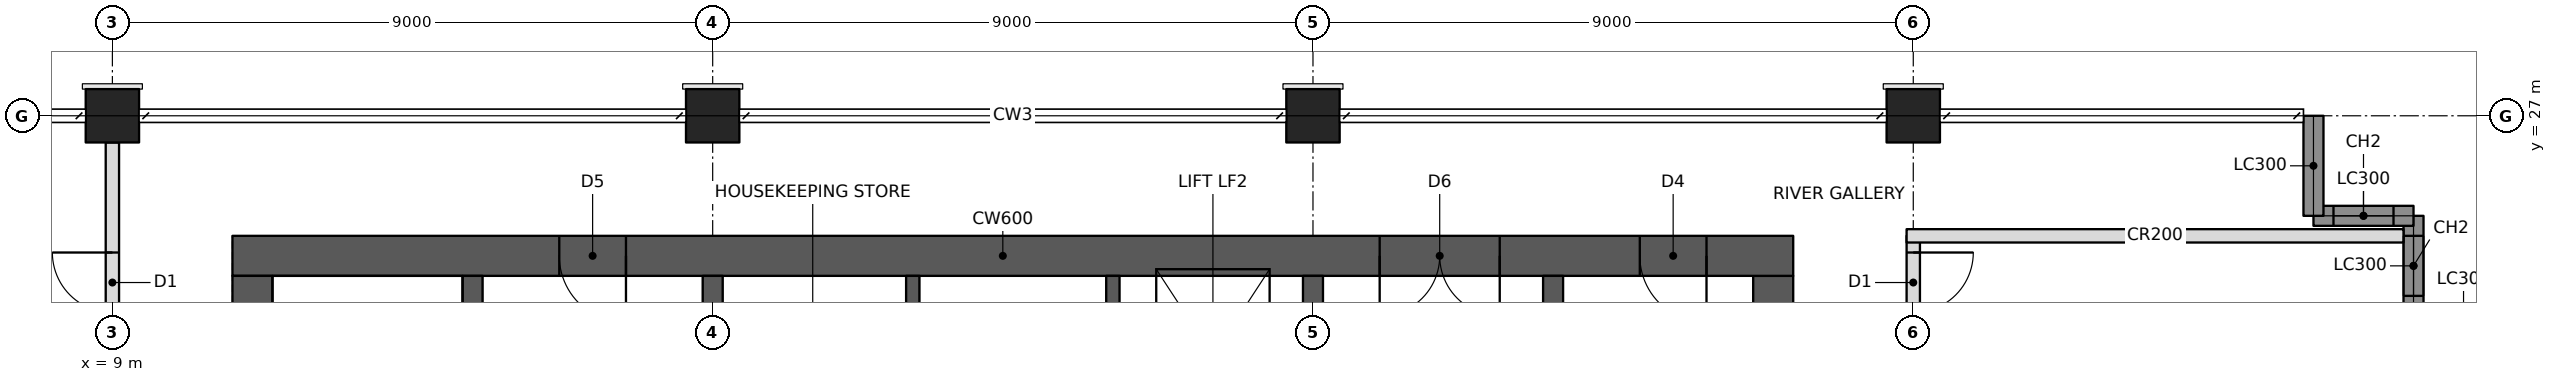
"""IFC4 building model, lengths in metres.
Left out: names, types, materials, properties, quantities, classifications, styles, units other than length and angle.
Written with IfcOpenShell. Run it as: python <this file> out.ifc"""

import sys

from ifc_helpers import new_model, si_unit, direction, frame, frame_2d, origin, origin_2d, place, context, subcontext, project, spatial, rectangle, hollow_rectangle, extrude, element, fill, save


model = new_model("IFC4")
c1 = context("Model", 3, precision=1e-05, world=origin(), true_north=direction((0.0, 1.0)))
c2 = subcontext(c1, "Body", "Model", "MODEL_VIEW")
j1 = project(units=[si_unit("LENGTHUNIT", "METRE"), si_unit("PLANEANGLEUNIT", "RADIAN")], contexts=[c1])
p1 = place(None, origin())
s1 = spatial("IfcSite", under=j1, at=p1, CompositionType="ELEMENT")
p2 = place(p1, origin())
s2 = spatial("IfcBuilding", under=s1, at=p2, CompositionType="ELEMENT")
p3 = place(p2, frame((0.0, 0.0, 197.8)))
s3 = spatial("IfcBuildingStorey", under=s2, at=p3, CompositionType="ELEMENT", Elevation=197.8)
for number, where, z_axis, x_axis in (
    (1, (9.0, 27.0, 0.0), (0.0, 0.0, 1.0), (1.0, 0.0, 0.0)),
    (2, (18.0, 27.0, 0.0), (0.0, 0.0, 1.0), (1.0, 0.0, 0.0)),
    (3, (27.0, 27.0, 0.0), (0.0, 0.0, 1.0), (1.0, 0.0, 0.0)),
    (4, (36.0, 27.0, 0.0), (0.0, 0.0, 1.0), (1.0, 0.0, 0.0)),
):
    element("IfcColumn", number, at=place(p3, frame(where, z_axis=z_axis, x_axis=x_axis)), inside=s3, PredefinedType="COLUMN", context=c2, shape_type="SweptSolid", body=[
        extrude(hollow_rectangle(XDim=0.8, YDim=0.8, WallThickness=0.06, at=origin_2d()), origin(), (0.0, 0.0, 1.0), 3.4),
    ])
p4 = place(p3, frame((10.8, 24.9, 0.0), z_axis=(0.0, 0.0, 1.0), x_axis=(1.0, 0.0, 0.0)))
e5 = element("IfcWall", 5, at=p4, inside=s3, PredefinedType="SHEAR", context=c2, shape_type="SweptSolid", body=[
    extrude(rectangle(XDim=23.4, YDim=0.6, at=frame_2d((11.7, 0.0))), origin(), (0.0, 0.0, 1.0), 3.4),
])
p5 = place(p4, frame((17.2, 0.0, 0.0)))
e6 = element("IfcOpeningElement", 6, at=p5, cuts=e5, PredefinedType="OPENING", context=c2, shape_type="SweptSolid", body=[
    extrude(rectangle(XDim=1.8, YDim=2.1, at=frame_2d((0.9, 1.05))), frame((0.0, 0.31, 0.0), z_axis=(0.0, -1.0, 0.0), x_axis=(1.0, 0.0, 0.0)), (0.0, 0.0, 1.0), 0.62),
])
p6 = place(p4, frame((21.1, 0.0, 0.0)))
e7 = element("IfcOpeningElement", 7, at=p6, cuts=e5, PredefinedType="OPENING", context=c2, shape_type="SweptSolid", body=[
    extrude(rectangle(XDim=1.0, YDim=2.1, at=frame_2d((0.5, 1.05))), frame((0.0, 0.31, 0.0), z_axis=(0.0, -1.0, 0.0), x_axis=(1.0, 0.0, 0.0)), (0.0, 0.0, 1.0), 0.62),
])
p7 = place(p4, frame((4.9, 0.0, 0.0)))
e8 = element("IfcOpeningElement", 8, at=p7, cuts=e5, PredefinedType="OPENING", context=c2, shape_type="SweptSolid", body=[
    extrude(rectangle(XDim=1.0, YDim=2.1, at=frame_2d((0.5, 1.05))), frame((0.0, 0.31, 0.0), z_axis=(0.0, -1.0, 0.0), x_axis=(1.0, 0.0, 0.0)), (0.0, 0.0, 1.0), 0.62),
])
for number, where, z_axis, x_axis in (
    (9, (11.1, 11.4, 0.0), (0.0, 0.0, 1.0), (0.0, 1.0, 0.0)),
    (10, (33.9, 11.4, 0.0), (0.0, 0.0, 1.0), (0.0, 1.0, 0.0)),
):
    element("IfcWall", number, at=place(p3, frame(where, z_axis=z_axis, x_axis=x_axis)), inside=s3, PredefinedType="SHEAR", context=c2, shape_type="SweptSolid", body=[
        extrude(rectangle(XDim=13.2, YDim=0.6, at=frame_2d((6.6, 0.0))), origin(), (0.0, 0.0, 1.0), 3.4),
    ])
p8 = place(p3, frame((14.4, 11.4, 0.0), z_axis=(0.0, 0.0, 1.0), x_axis=(0.0, 1.0, 0.0)))
e11 = element("IfcWall", 11, at=p8, inside=s3, PredefinedType="SHEAR", context=c2, shape_type="SweptSolid", body=[
    extrude(rectangle(XDim=13.2, YDim=0.3, at=frame_2d((6.6, 0.0))), origin(), (0.0, 0.0, 1.0), 3.4),
])
p9 = place(p3, frame((18.0, 11.4, 0.0), z_axis=(0.0, 0.0, 1.0), x_axis=(0.0, 1.0, 0.0)))
e12 = element("IfcWall", 12, at=p9, inside=s3, PredefinedType="SHEAR", context=c2, shape_type="SweptSolid", body=[
    extrude(rectangle(XDim=13.2, YDim=0.3, at=frame_2d((6.6, 0.0))), origin(), (0.0, 0.0, 1.0), 3.4),
])
p10 = place(p9, frame((3.6, 0.0, 0.0)))
e13 = element("IfcOpeningElement", 13, at=p10, cuts=e12, PredefinedType="OPENING", context=c2, shape_type="SweptSolid", body=[
    extrude(rectangle(XDim=1.0, YDim=2.1, at=frame_2d((0.5, 1.05))), frame((0.0, 0.16, 0.0), z_axis=(0.0, -1.0, 0.0), x_axis=(1.0, 0.0, 0.0)), (0.0, 0.0, 1.0), 0.32),
])
p11 = place(p9, frame((7.85, 0.0, 0.0)))
e14 = element("IfcOpeningElement", 14, at=p11, cuts=e12, PredefinedType="OPENING", context=c2, shape_type="SweptSolid", body=[
    extrude(rectangle(XDim=1.1, YDim=2.1, at=frame_2d((0.55, 1.05))), frame((0.0, 0.16, 0.0), z_axis=(0.0, -1.0, 0.0), x_axis=(1.0, 0.0, 0.0)), (0.0, 0.0, 1.0), 0.32),
])
p12 = place(p3, frame((27.0, 21.75, 0.0), z_axis=(0.0, 0.0, 1.0), x_axis=(0.0, 1.0, 0.0)))
e15 = element("IfcWall", 15, at=p12, inside=s3, PredefinedType="SHEAR", context=c2, shape_type="SweptSolid", body=[
    extrude(rectangle(XDim=2.85, YDim=0.3, at=frame_2d((1.425, 0.0))), origin(), (0.0, 0.0, 1.0), 3.4),
])
for number, where, z_axis, x_axis in (
    (16, (21.0, 21.75, 0.0), (0.0, 0.0, 1.0), (0.0, 1.0, 0.0)),
    (17, (24.0, 21.75, 0.0), (0.0, 0.0, 1.0), (0.0, 1.0, 0.0)),
):
    element("IfcWall", number, at=place(p3, frame(where, z_axis=z_axis, x_axis=x_axis)), inside=s3, PredefinedType="SHEAR", context=c2, shape_type="SweptSolid", body=[
        extrude(rectangle(XDim=2.85, YDim=0.2, at=frame_2d((1.425, 0.0))), origin(), (0.0, 0.0, 1.0), 3.4),
    ])
p13 = place(p3, frame((30.6, 11.4, 0.0), z_axis=(0.0, 0.0, 1.0), x_axis=(0.0, 1.0, 0.0)))
e18 = element("IfcWall", 18, at=p13, inside=s3, PredefinedType="SHEAR", context=c2, shape_type="SweptSolid", body=[
    extrude(rectangle(XDim=13.2, YDim=0.3, at=frame_2d((6.6, 0.0))), origin(), (0.0, 0.0, 1.0), 3.4),
])
p14 = place(p3, frame((43.5, 24.0, 0.0), z_axis=(0.0, 0.0, 1.0), x_axis=(0.0, 1.0, 0.0)))
e19 = element("IfcWall", 19, at=p14, inside=s3, PredefinedType="SOLIDWALL", context=c2, shape_type="SweptSolid", body=[
    extrude(rectangle(XDim=1.5, YDim=0.3, at=frame_2d((0.75, 0.0))), origin(), (0.0, 0.0, 1.0), 3.2),
])
p15 = place(p14, frame((0.3, 0.0, 0.6)))
e20 = element("IfcOpeningElement", 20, at=p15, cuts=e19, PredefinedType="OPENING", context=c2, shape_type="SweptSolid", body=[
    extrude(rectangle(XDim=0.9, YDim=2.2, at=frame_2d((0.45, 1.1))), frame((0.0, 0.16, 0.0), z_axis=(0.0, -1.0, 0.0), x_axis=(1.0, 0.0, 0.0)), (0.0, 0.0, 1.0), 0.32),
])
p16 = place(p3, frame((43.5, 25.5, 0.0), z_axis=(0.0, 0.0, 1.0), x_axis=(-1.0, 0.0, 0.0)))
e21 = element("IfcWall", 21, at=p16, inside=s3, PredefinedType="SOLIDWALL", context=c2, shape_type="SweptSolid", body=[
    extrude(rectangle(XDim=1.5, YDim=0.3, at=frame_2d((0.75, 0.0))), origin(), (0.0, 0.0, 1.0), 3.2),
])
p17 = place(p16, frame((0.3, 0.0, 0.6)))
e22 = element("IfcOpeningElement", 22, at=p17, cuts=e21, PredefinedType="OPENING", context=c2, shape_type="SweptSolid", body=[
    extrude(rectangle(XDim=0.9, YDim=2.2, at=frame_2d((0.45, 1.1))), frame((0.0, 0.16, 0.0), z_axis=(0.0, -1.0, 0.0), x_axis=(1.0, 0.0, 0.0)), (0.0, 0.0, 1.0), 0.32),
])
p18 = place(p3, frame((42.0, 25.5, 0.0), z_axis=(0.0, 0.0, 1.0), x_axis=(0.0, 1.0, 0.0)))
e23 = element("IfcWall", 23, at=p18, inside=s3, PredefinedType="SOLIDWALL", context=c2, shape_type="SweptSolid", body=[
    extrude(rectangle(XDim=1.5, YDim=0.3, at=frame_2d((0.75, 0.0))), origin(), (0.0, 0.0, 1.0), 2.42),
])
p19 = place(p3, frame((9.0, 18.4, 0.0), z_axis=(0.0, 0.0, 1.0), x_axis=(0.0, 1.0, 0.0)))
e24 = element("IfcWall", 24, at=p19, inside=s3, PredefinedType="PARTITIONING", context=c2, shape_type="SweptSolid", body=[
    extrude(rectangle(XDim=8.2, YDim=0.2, at=frame_2d((4.1, 0.0))), origin(), (0.0, 0.0, 1.0), 2.405),
])
p20 = place(p19, frame((5.65, 0.0, 0.0)))
e25 = element("IfcOpeningElement", 25, at=p20, cuts=e24, PredefinedType="OPENING", context=c2, shape_type="SweptSolid", body=[
    extrude(rectangle(XDim=0.9, YDim=2.1, at=frame_2d((0.45, 1.05))), frame((0.0, 0.11, 0.0), z_axis=(0.0, -1.0, 0.0), x_axis=(1.0, 0.0, 0.0)), (0.0, 0.0, 1.0), 0.22),
])
p21 = place(p3, frame((36.0, 18.4, 0.0), z_axis=(0.0, 0.0, 1.0), x_axis=(0.0, 1.0, 0.0)))
e26 = element("IfcWall", 26, at=p21, inside=s3, PredefinedType="PARTITIONING", context=c2, shape_type="SweptSolid", body=[
    extrude(rectangle(XDim=6.8, YDim=0.2, at=frame_2d((3.4, 0.0))), origin(), (0.0, 0.0, 1.0), 2.405),
])
p22 = place(p21, frame((5.65, 0.0, 0.0)))
e27 = element("IfcOpeningElement", 27, at=p22, cuts=e26, PredefinedType="OPENING", context=c2, shape_type="SweptSolid", body=[
    extrude(rectangle(XDim=0.9, YDim=2.1, at=frame_2d((0.45, 1.05))), frame((0.0, 0.11, 0.0), z_axis=(0.0, -1.0, 0.0), x_axis=(1.0, 0.0, 0.0)), (0.0, 0.0, 1.0), 0.22),
])
p23 = place(p3, frame((35.9, 25.2, 0.0), z_axis=(0.0, 0.0, 1.0), x_axis=(1.0, 0.0, 0.0)))
e28 = element("IfcWall", 28, at=p23, inside=s3, PredefinedType="PARTITIONING", context=c2, shape_type="SweptSolid", body=[
    extrude(rectangle(XDim=7.45, YDim=0.2, at=frame_2d((3.725, 0.0))), origin(), (0.0, 0.0, 1.0), 2.404),
])
p24 = place(p15, origin())
e29 = element("IfcWindow", 29, at=p24, inside=s3, PartitioningType="SINGLE_PANEL", PredefinedType="WINDOW", context=c2, shape_type="SweptSolid", body=[
    extrude(rectangle(XDim=0.9, YDim=2.2, at=frame_2d((0.45, 1.1))), frame((0.0, 0.03, 0.0), z_axis=(0.0, -1.0, 0.0), x_axis=(1.0, 0.0, 0.0)), (0.0, 0.0, 1.0), 0.06),
])
fill(e20, e29)
p25 = place(p17, origin())
e30 = element("IfcWindow", 30, at=p25, inside=s3, PartitioningType="SINGLE_PANEL", PredefinedType="WINDOW", context=c2, shape_type="SweptSolid", body=[
    extrude(rectangle(XDim=0.9, YDim=2.2, at=frame_2d((0.45, 1.1))), frame((0.0, 0.03, 0.0), z_axis=(0.0, -1.0, 0.0), x_axis=(1.0, 0.0, 0.0)), (0.0, 0.0, 1.0), 0.06),
])
fill(e22, e30)
p26 = place(p20, origin())
e31 = element("IfcDoor", 31, at=p26, inside=s3, OperationType="SINGLE_SWING_RIGHT", PredefinedType="DOOR", context=c2, shape_type="SweptSolid", body=[
    extrude(rectangle(XDim=0.9, YDim=2.1, at=frame_2d((0.45, 1.05))), frame((0.0, 0.025, 0.0), z_axis=(0.0, -1.0, 0.0), x_axis=(1.0, 0.0, 0.0)), (0.0, 0.0, 1.0), 0.05),
])
fill(e25, e31)
p27 = place(p22, frame((0.9, 0.0, 0.0), z_axis=(0.0, 0.0, 1.0), x_axis=(-1.0, 0.0, 0.0)))
e32 = element("IfcDoor", 32, at=p27, inside=s3, OperationType="SINGLE_SWING_LEFT", PredefinedType="DOOR", context=c2, shape_type="SweptSolid", body=[
    extrude(rectangle(XDim=0.9, YDim=2.1, at=frame_2d((0.45, 1.05))), frame((0.0, 0.025, 0.0), z_axis=(0.0, -1.0, 0.0), x_axis=(1.0, 0.0, 0.0)), (0.0, 0.0, 1.0), 0.05),
])
fill(e27, e32)
p28 = place(p5, frame((1.8, 0.0, 0.0), z_axis=(0.0, 0.0, 1.0), x_axis=(-1.0, 0.0, 0.0)))
e33 = element("IfcDoor", 33, at=p28, inside=s3, OperationType="DOUBLE_DOOR_SINGLE_SWING", PredefinedType="DOOR", context=c2, shape_type="SweptSolid", body=[
    extrude(rectangle(XDim=1.8, YDim=2.1, at=frame_2d((0.9, 1.05))), frame((0.0, 0.025, 0.0), z_axis=(0.0, -1.0, 0.0), x_axis=(1.0, 0.0, 0.0)), (0.0, 0.0, 1.0), 0.05),
])
fill(e6, e33)
p29 = place(p6, frame((1.0, 0.0, 0.0), z_axis=(0.0, 0.0, 1.0), x_axis=(-1.0, 0.0, 0.0)))
e34 = element("IfcDoor", 34, at=p29, inside=s3, OperationType="SINGLE_SWING_LEFT", PredefinedType="DOOR", context=c2, shape_type="SweptSolid", body=[
    extrude(rectangle(XDim=1.0, YDim=2.1, at=frame_2d((0.5, 1.05))), frame((0.0, 0.025, 0.0), z_axis=(0.0, -1.0, 0.0), x_axis=(1.0, 0.0, 0.0)), (0.0, 0.0, 1.0), 0.05),
])
fill(e7, e34)
p30 = place(p7, frame((1.0, 0.0, 0.0), z_axis=(0.0, 0.0, 1.0), x_axis=(-1.0, 0.0, 0.0)))
e35 = element("IfcDoor", 35, at=p30, inside=s3, OperationType="SINGLE_SWING_LEFT", PredefinedType="DOOR", context=c2, shape_type="SweptSolid", body=[
    extrude(rectangle(XDim=1.0, YDim=2.1, at=frame_2d((0.5, 1.05))), frame((0.0, 0.025, 0.0), z_axis=(0.0, -1.0, 0.0), x_axis=(1.0, 0.0, 0.0)), (0.0, 0.0, 1.0), 0.05),
])
fill(e8, e35)
save(model, sys.argv[1])
